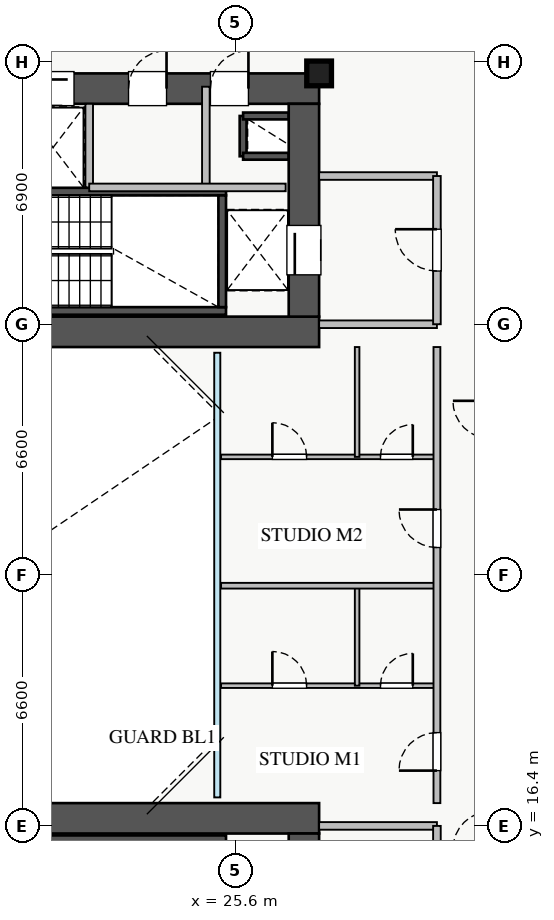
"""IFC4 building model, lengths in metres.
Left out: names, types, materials, properties, quantities, classifications, styles, units other than length and angle.
Written with IfcOpenShell. Run it as: python <this file> out.ifc"""

import sys

from ifc_helpers import new_model, si_unit, direction, frame, frame_2d, origin, origin_2d, place, context, subcontext, project, spatial, rectangle, extrude, source, transform, mapped, element, fill, save


model = new_model("IFC4")
c1 = context("Model", 3, precision=1e-05, world=origin(), true_north=direction((0.0, 1.0)))
c2 = subcontext(c1, "Body", "Model", "MODEL_VIEW")
j1 = project(units=[si_unit("LENGTHUNIT", "METRE"), si_unit("PLANEANGLEUNIT", "RADIAN")], contexts=[c1])
p1 = place(None, origin())
s1 = spatial("IfcSite", under=j1, at=p1, CompositionType="ELEMENT")
p2 = place(p1, origin())
s2 = spatial("IfcBuilding", under=s1, at=p2, CompositionType="ELEMENT")
p3 = place(p2, frame((0.0, 0.0, 26.25)))
s3 = spatial("IfcBuildingStorey", under=s2, at=p3, CompositionType="ELEMENT", Elevation=26.25)
p4 = place(p3, frame((25.8, 34.02, 0.0), z_axis=(0.0, 0.0, 1.0), x_axis=(0.0, 1.0, 0.0)))
e1 = element("IfcWall", 1, at=p4, inside=s3, PredefinedType="SHEAR", context=c2, shape_type="SweptSolid", body=[
    extrude(rectangle(XDim=1.06, YDim=0.18, at=frame_2d((0.53, 0.0))), origin(), (0.0, 0.0, 1.0), 3.07),
])
for number, where, z_axis, x_axis in (
    (2, (25.8, 35.08, 0.0), (0.0, 0.0, 1.0), (1.0, 0.0, 0.0)),
    (3, (25.8, 34.02, 0.0), (0.0, 0.0, 1.0), (1.0, 0.0, 0.0)),
):
    element("IfcWall", number, at=place(p3, frame(where, z_axis=z_axis, x_axis=x_axis)), inside=s3, PredefinedType="SHEAR", context=c2, shape_type="SweptSolid", body=[
        extrude(rectangle(XDim=1.2, YDim=0.18, at=frame_2d((0.6, 0.0))), origin(), (0.0, 0.0, 1.0), 3.07),
    ])
p5 = place(p3, frame((19.88, 33.2, 0.0), z_axis=(0.0, 0.0, 1.0), x_axis=(1.0, 0.0, 0.0)))
e4 = element("IfcWall", 4, at=p5, inside=s3, PredefinedType="SHEAR", context=c2, shape_type="SweptSolid", body=[
    extrude(rectangle(XDim=1.87, YDim=0.18, at=frame_2d((0.935, 0.0))), origin(), (0.0, 0.0, 1.0), 3.07),
])
p6 = place(p3, frame((18.2, 29.95, 0.0), z_axis=(0.0, 0.0, 1.0), x_axis=(1.0, 0.0, 0.0)))
e5 = element("IfcWall", 5, at=p6, inside=s3, PredefinedType="SHEAR", context=c2, shape_type="SweptSolid", body=[
    extrude(rectangle(XDim=7.15, YDim=0.2, at=frame_2d((3.575, 0.0))), origin(), (0.0, 0.0, 1.0), 3.25),
])
p7 = place(p3, frame((18.2, 33.09, 0.0), z_axis=(0.0, 0.0, 1.0), x_axis=(1.0, 0.0, 0.0)))
e6 = element("IfcWall", 6, at=p7, inside=s3, PredefinedType="SHEAR", context=c2, shape_type="SweptSolid", body=[
    extrude(rectangle(XDim=7.15, YDim=0.2, at=frame_2d((3.575, 0.0))), origin(), (0.0, 0.0, 1.0), 3.25),
])
p8 = place(p7, frame((0.35, 0.0, 0.0)))
e7 = element("IfcOpeningElement", 7, at=p8, cuts=e6, PredefinedType="OPENING", context=c2, shape_type="SweptSolid", body=[
    extrude(rectangle(XDim=1.1, YDim=2.05, at=frame_2d((0.55, 1.025))), frame((0.0, 0.11, 0.0), z_axis=(0.0, -1.0, 0.0), x_axis=(1.0, 0.0, 0.0)), (0.0, 0.0, 1.0), 0.22),
])
p9 = place(p3, frame((25.25, 30.05, 0.0), z_axis=(0.0, 0.0, 1.0), x_axis=(0.0, 1.0, 0.0)))
e8 = element("IfcWall", 8, at=p9, inside=s3, PredefinedType="SHEAR", context=c2, shape_type="SweptSolid", body=[
    extrude(rectangle(XDim=2.94, YDim=0.2, at=frame_2d((1.47, 0.0))), origin(), (0.0, 0.0, 1.0), 3.25),
])
p10 = place(p3, frame((18.2, 16.05, 0.0), z_axis=(0.0, 0.0, 1.0), x_axis=(1.0, 0.0, 0.0)))
e9 = element("IfcWall", 9, at=p10, inside=s3, PredefinedType="SHEAR", context=c2, shape_type="SweptSolid", body=[
    extrude(rectangle(XDim=7.15, YDim=0.2, at=frame_2d((3.575, 0.0))), origin(), (0.0, 0.0, 1.0), 3.25),
])
p11 = place(p3, frame((10.2, 29.4, 0.0), z_axis=(0.0, 0.0, 1.0), x_axis=(1.0, 0.0, 0.0)))
e10 = element("IfcWall", 10, at=p11, inside=s3, PredefinedType="SHEAR", context=c2, shape_type="SweptSolid", body=[
    extrude(rectangle(XDim=17.6, YDim=0.8, at=frame_2d((8.8, 0.0))), origin(), (0.0, 0.0, 1.0), 3.25),
])
p12 = place(p3, frame((10.2, 35.8, 0.0), z_axis=(0.0, 0.0, 1.0), x_axis=(1.0, 0.0, 0.0)))
e11 = element("IfcWall", 11, at=p12, inside=s3, PredefinedType="SHEAR", context=c2, shape_type="SweptSolid", body=[
    extrude(rectangle(XDim=17.6, YDim=0.8, at=frame_2d((8.8, 0.0))), origin(), (0.0, 0.0, 1.0), 3.25),
])
p13 = place(p12, frame((1.15, 0.0, 0.0)))
e12 = element("IfcOpeningElement", 12, at=p13, cuts=e11, PredefinedType="OPENING", context=c2, shape_type="SweptSolid", body=[
    extrude(rectangle(XDim=1.1, YDim=2.05, at=frame_2d((0.55, 1.025))), frame((0.0, 0.41, 0.0), z_axis=(0.0, -1.0, 0.0), x_axis=(1.0, 0.0, 0.0)), (0.0, 0.0, 1.0), 0.82),
])
p14 = place(p12, frame((8.3, 0.0, 0.0)))
e13 = element("IfcOpeningElement", 13, at=p14, cuts=e11, PredefinedType="OPENING", context=c2, shape_type="SweptSolid", body=[
    extrude(rectangle(XDim=1.1, YDim=2.05, at=frame_2d((0.55, 1.025))), frame((0.0, 0.41, 0.0), z_axis=(0.0, -1.0, 0.0), x_axis=(1.0, 0.0, 0.0)), (0.0, 0.0, 1.0), 0.82),
])
p15 = place(p12, frame((10.05, 0.0, 0.0)))
e14 = element("IfcOpeningElement", 14, at=p15, cuts=e11, PredefinedType="OPENING", context=c2, shape_type="SweptSolid", body=[
    extrude(rectangle(XDim=1.1, YDim=2.05, at=frame_2d((0.55, 1.025))), frame((0.0, 0.41, 0.0), z_axis=(0.0, -1.0, 0.0), x_axis=(1.0, 0.0, 0.0)), (0.0, 0.0, 1.0), 0.82),
])
p16 = place(p12, frame((14.74, 0.0, 0.0)))
e15 = element("IfcOpeningElement", 15, at=p16, cuts=e11, PredefinedType="OPENING", context=c2, shape_type="SweptSolid", body=[
    extrude(rectangle(XDim=1.0, YDim=2.05, at=frame_2d((0.5, 1.025))), frame((0.0, 0.41, 0.0), z_axis=(0.0, -1.0, 0.0), x_axis=(1.0, 0.0, 0.0)), (0.0, 0.0, 1.0), 0.82),
])
p17 = place(p12, frame((12.585, 0.0, 0.0)))
e16 = element("IfcOpeningElement", 16, at=p17, cuts=e11, PredefinedType="OPENING", context=c2, shape_type="SweptSolid", body=[
    extrude(rectangle(XDim=1.0, YDim=2.05, at=frame_2d((0.5, 1.025))), frame((0.0, 0.41, 0.0), z_axis=(0.0, -1.0, 0.0), x_axis=(1.0, 0.0, 0.0)), (0.0, 0.0, 1.0), 0.82),
])
p18 = place(p3, frame((27.4, 29.8, 0.0), z_axis=(0.0, 0.0, 1.0), x_axis=(0.0, 1.0, 0.0)))
e17 = element("IfcWall", 17, at=p18, inside=s3, PredefinedType="SHEAR", context=c2, shape_type="SweptSolid", body=[
    extrude(rectangle(XDim=5.6, YDim=0.8, at=frame_2d((2.8, 0.0))), origin(), (0.0, 0.0, 1.0), 3.25),
])
p19 = place(p18, frame((1.1, 0.0, 0.0)))
e18 = element("IfcOpeningElement", 18, at=p19, cuts=e17, PredefinedType="OPENING", context=c2, shape_type="SweptSolid", body=[
    extrude(rectangle(XDim=1.3, YDim=2.05, at=frame_2d((0.65, 1.025))), frame((0.0, 0.41, 0.0), z_axis=(0.0, -1.0, 0.0), x_axis=(1.0, 0.0, 0.0)), (0.0, 0.0, 1.0), 0.82),
])
p20 = place(p3, frame((10.2, 16.6, 0.0), z_axis=(0.0, 0.0, 1.0), x_axis=(1.0, 0.0, 0.0)))
e19 = element("IfcWall", 19, at=p20, inside=s3, PredefinedType="SHEAR", context=c2, shape_type="SweptSolid", body=[
    extrude(rectangle(XDim=17.6, YDim=0.8, at=frame_2d((8.8, 0.0))), origin(), (0.0, 0.0, 1.0), 3.25),
])
p21 = place(p3, frame((27.4, 10.6, 0.0), z_axis=(0.0, 0.0, 1.0), x_axis=(0.0, 1.0, 0.0)))
e20 = element("IfcWall", 20, at=p21, inside=s3, PredefinedType="SHEAR", context=c2, shape_type="SweptSolid", body=[
    extrude(rectangle(XDim=5.6, YDim=0.8, at=frame_2d((2.8, 0.0))), origin(), (0.0, 0.0, 1.0), 3.25),
])
p22 = place(p21, frame((2.1, 0.0, 0.0)))
e21 = element("IfcOpeningElement", 21, at=p22, cuts=e20, PredefinedType="OPENING", context=c2, shape_type="SweptSolid", body=[
    extrude(rectangle(XDim=1.3, YDim=2.05, at=frame_2d((0.65, 1.025))), frame((0.0, 0.41, 0.0), z_axis=(0.0, -1.0, 0.0), x_axis=(1.0, 0.0, 0.0)), (0.0, 0.0, 1.0), 0.82),
])
m1 = source(origin(), c2, "Body", "SweptSolid", [
    extrude(rectangle(XDim=0.65, YDim=0.65, at=origin_2d()), origin(), (0.0, 0.0, 1.0), 3.25),
])
p23 = place(p3, frame((27.8, 36.2, 0.0), z_axis=(0.0, 0.0, 1.0), x_axis=(1.0, 0.0, 0.0)))
e22 = element("IfcColumn", 22, at=p23, inside=s3, PredefinedType="PILASTER", context=c2, shape_type="MappedRepresentation", body=[
    mapped(m1, transform((0.0, 0.0, 0.0), x_axis=(1.0, 0.0, 0.0), y_axis=(0.0, 1.0, 0.0), z_axis=(0.0, 0.0, 1.0), scale=1.0)),
])
for number, where, z_axis, x_axis in (
    (23, (27.8, 29.6, 0.0), (0.0, 0.0, 1.0), (1.0, 0.0, 0.0)),
    (24, (27.8, 33.5, 0.0), (0.0, 0.0, 1.0), (1.0, 0.0, 0.0)),
):
    element("IfcWall", number, at=place(p3, frame(where, z_axis=z_axis, x_axis=x_axis)), inside=s3, PredefinedType="PARTITIONING", context=c2, shape_type="SweptSolid", body=[
        extrude(rectangle(XDim=3.1, YDim=0.2, at=frame_2d((1.55, 0.0))), origin(), (0.0, 0.0, 1.0), 3.07),
    ])
p24 = place(p3, frame((30.9, 29.6, 0.0), z_axis=(0.0, 0.0, 1.0), x_axis=(0.0, 1.0, 0.0)))
e25 = element("IfcWall", 25, at=p24, inside=s3, PredefinedType="PARTITIONING", context=c2, shape_type="SweptSolid", body=[
    extrude(rectangle(XDim=3.9, YDim=0.2, at=frame_2d((1.95, 0.0))), origin(), (0.0, 0.0, 1.0), 3.07),
])
p25 = place(p24, frame((1.4, 0.0, 0.0)))
e26 = element("IfcOpeningElement", 26, at=p25, cuts=e25, PredefinedType="OPENING", context=c2, shape_type="SweptSolid", body=[
    extrude(rectangle(XDim=1.1, YDim=2.05, at=frame_2d((0.55, 1.025))), frame((0.0, 0.11, 0.0), z_axis=(0.0, -1.0, 0.0), x_axis=(1.0, 0.0, 0.0)), (0.0, 0.0, 1.0), 0.22),
])
p26 = place(p3, frame((27.8, 16.4, 0.0), z_axis=(0.0, 0.0, 1.0), x_axis=(1.0, 0.0, 0.0)))
e27 = element("IfcWall", 27, at=p26, inside=s3, PredefinedType="PARTITIONING", context=c2, shape_type="SweptSolid", body=[
    extrude(rectangle(XDim=3.1, YDim=0.2, at=frame_2d((1.55, 0.0))), origin(), (0.0, 0.0, 1.0), 3.07),
])
p27 = place(p3, frame((30.9, 12.5, 0.0), z_axis=(0.0, 0.0, 1.0), x_axis=(0.0, 1.0, 0.0)))
e28 = element("IfcWall", 28, at=p27, inside=s3, PredefinedType="PARTITIONING", context=c2, shape_type="SweptSolid", body=[
    extrude(rectangle(XDim=3.9, YDim=0.2, at=frame_2d((1.95, 0.0))), origin(), (0.0, 0.0, 1.0), 3.07),
])
p28 = place(p27, frame((1.4, 0.0, 0.0)))
e29 = element("IfcOpeningElement", 29, at=p28, cuts=e28, PredefinedType="OPENING", context=c2, shape_type="SweptSolid", body=[
    extrude(rectangle(XDim=1.1, YDim=2.05, at=frame_2d((0.55, 1.025))), frame((0.0, 0.11, 0.0), z_axis=(0.0, -1.0, 0.0), x_axis=(1.0, 0.0, 0.0)), (0.0, 0.0, 1.0), 0.22),
])
p29 = place(p3, frame((24.82, 33.2, 0.0), z_axis=(0.0, 0.0, 1.0), x_axis=(0.0, 1.0, 0.0)))
e30 = element("IfcWall", 30, at=p29, inside=s3, PredefinedType="PARTITIONING", context=c2, shape_type="SweptSolid", body=[
    extrude(rectangle(XDim=2.65, YDim=0.2, at=frame_2d((1.325, 0.0))), origin(), (0.0, 0.0, 1.0), 3.07),
])
p30 = place(p3, frame((21.75, 33.2, 0.0), z_axis=(0.0, 0.0, 1.0), x_axis=(0.0, 1.0, 0.0)))
e31 = element("IfcWall", 31, at=p30, inside=s3, PredefinedType="PARTITIONING", context=c2, shape_type="SweptSolid", body=[
    extrude(rectangle(XDim=2.2, YDim=0.2, at=frame_2d((1.1, 0.0))), origin(), (0.0, 0.0, 1.0), 3.07),
])
p31 = place(p3, frame((21.75, 33.2, 0.0), z_axis=(0.0, 0.0, 1.0), x_axis=(1.0, 0.0, 0.0)))
e32 = element("IfcWall", 32, at=p31, inside=s3, PredefinedType="PARTITIONING", context=c2, shape_type="SweptSolid", body=[
    extrude(rectangle(XDim=5.17, YDim=0.2, at=frame_2d((2.585, 0.0))), origin(), (0.0, 0.0, 1.0), 3.07),
])
p32 = place(p3, frame((25.22, 20.09, 0.0), z_axis=(0.0, 0.0, 1.0), x_axis=(1.0, 0.0, 0.0)))
e33 = element("IfcWall", 33, at=p32, inside=s3, PredefinedType="PLUMBINGWALL", context=c2, shape_type="SweptSolid", body=[
    extrude(rectangle(XDim=5.68, YDim=0.12, at=frame_2d((2.84, 0.0))), origin(), (0.0, 0.0, 1.0), 2.625),
])
p33 = place(p32, frame((1.35, 0.0, 0.0)))
e34 = element("IfcOpeningElement", 34, at=p33, cuts=e33, PredefinedType="OPENING", context=c2, shape_type="SweptSolid", body=[
    extrude(rectangle(XDim=0.9, YDim=2.05, at=frame_2d((0.45, 1.025))), frame((0.0, 0.07, 0.0), z_axis=(0.0, -1.0, 0.0), x_axis=(1.0, 0.0, 0.0)), (0.0, 0.0, 1.0), 0.14),
])
p34 = place(p32, frame((4.195, 0.0, 0.0)))
e35 = element("IfcOpeningElement", 35, at=p34, cuts=e33, PredefinedType="OPENING", context=c2, shape_type="SweptSolid", body=[
    extrude(rectangle(XDim=0.85, YDim=2.05, at=frame_2d((0.425, 1.025))), frame((0.0, 0.07, 0.0), z_axis=(0.0, -1.0, 0.0), x_axis=(1.0, 0.0, 0.0)), (0.0, 0.0, 1.0), 0.14),
])
p35 = place(p3, frame((28.8, 20.09, 0.0), z_axis=(0.0, 0.0, 1.0), x_axis=(0.0, 1.0, 0.0)))
e36 = element("IfcWall", 36, at=p35, inside=s3, PredefinedType="PLUMBINGWALL", context=c2, shape_type="SweptSolid", body=[
    extrude(rectangle(XDim=2.63, YDim=0.12, at=frame_2d((1.315, 0.0))), origin(), (0.0, 0.0, 1.0), 3.07),
])
p36 = place(p3, frame((25.22, 26.11, 0.0), z_axis=(0.0, 0.0, 1.0), x_axis=(1.0, 0.0, 0.0)))
e37 = element("IfcWall", 37, at=p36, inside=s3, PredefinedType="PLUMBINGWALL", context=c2, shape_type="SweptSolid", body=[
    extrude(rectangle(XDim=5.68, YDim=0.12, at=frame_2d((2.84, 0.0))), origin(), (0.0, 0.0, 1.0), 2.625),
])
p37 = place(p36, frame((1.35, 0.0, 0.0)))
e38 = element("IfcOpeningElement", 38, at=p37, cuts=e37, PredefinedType="OPENING", context=c2, shape_type="SweptSolid", body=[
    extrude(rectangle(XDim=0.9, YDim=2.05, at=frame_2d((0.45, 1.025))), frame((0.0, 0.07, 0.0), z_axis=(0.0, -1.0, 0.0), x_axis=(1.0, 0.0, 0.0)), (0.0, 0.0, 1.0), 0.14),
])
p38 = place(p36, frame((4.195, 0.0, 0.0)))
e39 = element("IfcOpeningElement", 39, at=p38, cuts=e37, PredefinedType="OPENING", context=c2, shape_type="SweptSolid", body=[
    extrude(rectangle(XDim=0.85, YDim=2.05, at=frame_2d((0.425, 1.025))), frame((0.0, 0.07, 0.0), z_axis=(0.0, -1.0, 0.0), x_axis=(1.0, 0.0, 0.0)), (0.0, 0.0, 1.0), 0.14),
])
p39 = place(p3, frame((28.8, 26.11, 0.0), z_axis=(0.0, 0.0, 1.0), x_axis=(0.0, 1.0, 0.0)))
e40 = element("IfcWall", 40, at=p39, inside=s3, PredefinedType="PLUMBINGWALL", context=c2, shape_type="SweptSolid", body=[
    extrude(rectangle(XDim=2.89, YDim=0.12, at=frame_2d((1.445, 0.0))), origin(), (0.0, 0.0, 1.0), 3.07),
])
p40 = place(p3, frame((25.22, 22.72, 0.0), z_axis=(0.0, 0.0, 1.0), x_axis=(1.0, 0.0, 0.0)))
e41 = element("IfcWall", 41, at=p40, inside=s3, PredefinedType="PARTITIONING", context=c2, shape_type="SweptSolid", body=[
    extrude(rectangle(XDim=5.68, YDim=0.15, at=frame_2d((2.84, 0.0))), origin(), (0.0, 0.0, 1.0), 3.07),
])
p41 = place(p3, frame((30.9, 17.0, 0.0), z_axis=(0.0, 0.0, 1.0), x_axis=(0.0, 1.0, 0.0)))
e42 = element("IfcWall", 42, at=p41, inside=s3, PredefinedType="PARTITIONING", context=c2, shape_type="SweptSolid", body=[
    extrude(rectangle(XDim=12.0, YDim=0.18, at=frame_2d((6.0, 0.0))), origin(), (0.0, 0.0, 1.0), 3.07),
])
p42 = place(p41, frame((0.855, 0.0, 0.0)))
e43 = element("IfcOpeningElement", 43, at=p42, cuts=e42, PredefinedType="OPENING", context=c2, shape_type="SweptSolid", body=[
    extrude(rectangle(XDim=1.0, YDim=2.05, at=frame_2d((0.5, 1.025))), frame((0.0, 0.1, 0.0), z_axis=(0.0, -1.0, 0.0), x_axis=(1.0, 0.0, 0.0)), (0.0, 0.0, 1.0), 0.2),
])
p43 = place(p41, frame((6.725, 0.0, 0.0)))
e44 = element("IfcOpeningElement", 44, at=p43, cuts=e42, PredefinedType="OPENING", context=c2, shape_type="SweptSolid", body=[
    extrude(rectangle(XDim=1.0, YDim=2.05, at=frame_2d((0.5, 1.025))), frame((0.0, 0.1, 0.0), z_axis=(0.0, -1.0, 0.0), x_axis=(1.0, 0.0, 0.0)), (0.0, 0.0, 1.0), 0.2),
])
m2 = source(origin(), c2, "Body", "SweptSolid", [
    extrude(rectangle(XDim=1.3, YDim=2.05, at=frame_2d((0.65, 1.025))), frame((0.0, 0.025, 0.0), z_axis=(0.0, -1.0, 0.0), x_axis=(1.0, 0.0, 0.0)), (0.0, 0.0, 1.0), 0.05),
])
p44 = place(p19, origin())
e45 = element("IfcDoor", 45, at=p44, inside=s3, OperationType="SLIDING_TO_LEFT", PredefinedType="DOOR", context=c2, shape_type="MappedRepresentation", body=[
    mapped(m2, transform((0.0, 0.0, 0.0), x_axis=(1.0, 0.0, 0.0), y_axis=(0.0, 1.0, 0.0), z_axis=(0.0, 0.0, 1.0), scale=1.0)),
])
fill(e18, e45)
m3 = source(origin(), c2, "Body", "SweptSolid", [
    extrude(rectangle(XDim=1.1, YDim=2.05, at=frame_2d((0.55, 1.025))), frame((0.0, 0.025, 0.0), z_axis=(0.0, -1.0, 0.0), x_axis=(1.0, 0.0, 0.0)), (0.0, 0.0, 1.0), 0.05),
])
p45 = place(p15, origin())
e46 = element("IfcDoor", 46, at=p45, inside=s3, OperationType="SLIDING_TO_LEFT", PredefinedType="DOOR", context=c2, shape_type="MappedRepresentation", body=[
    mapped(m3, transform((0.0, 0.0, 0.0), x_axis=(1.0, 0.0, 0.0), y_axis=(0.0, 1.0, 0.0), z_axis=(0.0, 0.0, 1.0), scale=1.0)),
])
fill(e14, e46)
m4 = source(origin(), c2, "Body", "SweptSolid", [
    extrude(rectangle(XDim=1.0, YDim=2.05, at=frame_2d((0.5, 1.025))), frame((0.0, 0.025, 0.0), z_axis=(0.0, -1.0, 0.0), x_axis=(1.0, 0.0, 0.0)), (0.0, 0.0, 1.0), 0.05),
])
p46 = place(p16, origin())
e47 = element("IfcDoor", 47, at=p46, inside=s3, OperationType="SINGLE_SWING_RIGHT", PredefinedType="DOOR", context=c2, shape_type="MappedRepresentation", body=[
    mapped(m4, transform((0.0, 0.0, 0.0), x_axis=(1.0, 0.0, 0.0), y_axis=(0.0, 1.0, 0.0), z_axis=(0.0, 0.0, 1.0), scale=1.0)),
])
fill(e15, e47)
p47 = place(p17, origin())
e48 = element("IfcDoor", 48, at=p47, inside=s3, OperationType="SINGLE_SWING_RIGHT", PredefinedType="DOOR", context=c2, shape_type="MappedRepresentation", body=[
    mapped(m4, transform((0.0, 0.0, 0.0), x_axis=(1.0, 0.0, 0.0), y_axis=(0.0, 1.0, 0.0), z_axis=(0.0, 0.0, 1.0), scale=1.0)),
])
fill(e16, e48)
p48 = place(p25, origin())
e49 = element("IfcDoor", 49, at=p48, inside=s3, OperationType="SINGLE_SWING_RIGHT", PredefinedType="DOOR", context=c2, shape_type="MappedRepresentation", body=[
    mapped(m3, transform((0.0, 0.0, 0.0), x_axis=(1.0, 0.0, 0.0), y_axis=(0.0, 1.0, 0.0), z_axis=(0.0, 0.0, 1.0), scale=1.0)),
])
fill(e26, e49)
m5 = source(origin(), c2, "Body", "SweptSolid", [
    extrude(rectangle(XDim=0.9, YDim=2.05, at=frame_2d((0.45, 1.025))), frame((0.0, 0.025, 0.0), z_axis=(0.0, -1.0, 0.0), x_axis=(1.0, 0.0, 0.0)), (0.0, 0.0, 1.0), 0.05),
])
p49 = place(p33, origin())
e50 = element("IfcDoor", 50, at=p49, inside=s3, OperationType="SINGLE_SWING_LEFT", PredefinedType="DOOR", context=c2, shape_type="MappedRepresentation", body=[
    mapped(m5, transform((0.0, 0.0, 0.0), x_axis=(1.0, 0.0, 0.0), y_axis=(0.0, 1.0, 0.0), z_axis=(0.0, 0.0, 1.0), scale=1.0)),
])
fill(e34, e50)
m6 = source(origin(), c2, "Body", "SweptSolid", [
    extrude(rectangle(XDim=0.85, YDim=2.05, at=frame_2d((0.425, 1.025))), frame((0.0, 0.025, 0.0), z_axis=(0.0, -1.0, 0.0), x_axis=(1.0, 0.0, 0.0)), (0.0, 0.0, 1.0), 0.05),
])
p50 = place(p34, origin())
e51 = element("IfcDoor", 51, at=p50, inside=s3, OperationType="SINGLE_SWING_RIGHT", PredefinedType="DOOR", context=c2, shape_type="MappedRepresentation", body=[
    mapped(m6, transform((0.0, 0.0, 0.0), x_axis=(1.0, 0.0, 0.0), y_axis=(0.0, 1.0, 0.0), z_axis=(0.0, 0.0, 1.0), scale=1.0)),
])
fill(e35, e51)
p51 = place(p37, origin())
e52 = element("IfcDoor", 52, at=p51, inside=s3, OperationType="SINGLE_SWING_LEFT", PredefinedType="DOOR", context=c2, shape_type="MappedRepresentation", body=[
    mapped(m5, transform((0.0, 0.0, 0.0), x_axis=(1.0, 0.0, 0.0), y_axis=(0.0, 1.0, 0.0), z_axis=(0.0, 0.0, 1.0), scale=1.0)),
])
fill(e38, e52)
p52 = place(p38, origin())
e53 = element("IfcDoor", 53, at=p52, inside=s3, OperationType="SINGLE_SWING_RIGHT", PredefinedType="DOOR", context=c2, shape_type="MappedRepresentation", body=[
    mapped(m6, transform((0.0, 0.0, 0.0), x_axis=(1.0, 0.0, 0.0), y_axis=(0.0, 1.0, 0.0), z_axis=(0.0, 0.0, 1.0), scale=1.0)),
])
fill(e39, e53)
p53 = place(p42, origin())
e54 = element("IfcDoor", 54, at=p53, inside=s3, OperationType="SINGLE_SWING_LEFT", PredefinedType="DOOR", context=c2, shape_type="MappedRepresentation", body=[
    mapped(m4, transform((0.0, 0.0, 0.0), x_axis=(1.0, 0.0, 0.0), y_axis=(0.0, 1.0, 0.0), z_axis=(0.0, 0.0, 1.0), scale=1.0)),
])
fill(e43, e54)
p54 = place(p43, origin())
e55 = element("IfcDoor", 55, at=p54, inside=s3, OperationType="SINGLE_SWING_RIGHT", PredefinedType="DOOR", context=c2, shape_type="MappedRepresentation", body=[
    mapped(m4, transform((0.0, 0.0, 0.0), x_axis=(1.0, 0.0, 0.0), y_axis=(0.0, 1.0, 0.0), z_axis=(0.0, 0.0, 1.0), scale=1.0)),
])
fill(e44, e55)
save(model, sys.argv[1])
